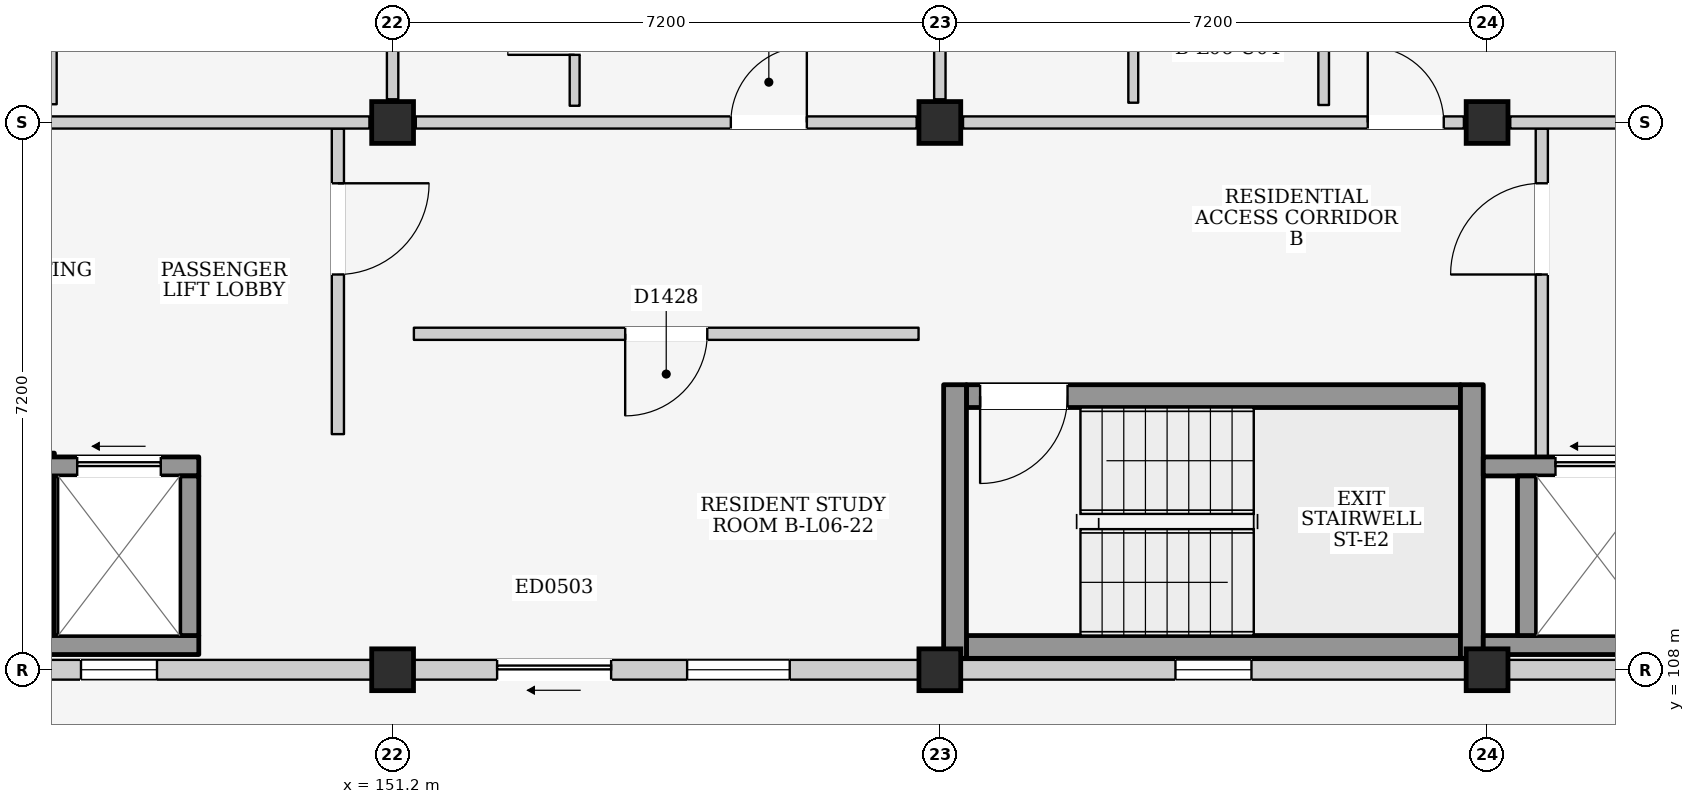
"""IFC4 building model, lengths in metres.
Left out: names, types, materials, properties, quantities, classifications, styles, units other than length and angle.
Written with IfcOpenShell. Run it as: python <this file> out.ifc"""

import sys

from ifc_helpers import new_model, si_unit, direction, frame, frame_2d, origin, origin_2d, place, context, subcontext, project, spatial, rectangle, extrude, element, fill, save


model = new_model("IFC4")
c1 = context("Model", 3, precision=1e-05, world=origin(), true_north=direction((0.0, 1.0)))
c2 = subcontext(c1, "Body", "Model", "MODEL_VIEW")
j1 = project(units=[si_unit("LENGTHUNIT", "METRE"), si_unit("PLANEANGLEUNIT", "RADIAN")], contexts=[c1])
p1 = place(None, origin())
s1 = spatial("IfcSite", under=j1, at=p1, CompositionType="ELEMENT")
p2 = place(p1, origin())
s2 = spatial("IfcBuilding", under=s1, at=p2, CompositionType="ELEMENT")
p3 = place(p2, frame((0.0, 0.0, 21.9)))
s3 = spatial("IfcBuildingStorey", under=s2, at=p3, CompositionType="ELEMENT", Elevation=21.9)
for number, where, z_axis, x_axis in (
    (1, (151.2, 108.0, 0.0), (0.0, 0.0, 1.0), (1.0, 0.0, 0.0)),
    (2, (151.2, 115.2, 0.0), (0.0, 0.0, 1.0), (1.0, 0.0, 0.0)),
    (3, (158.4, 108.0, 0.0), (0.0, 0.0, 1.0), (1.0, 0.0, 0.0)),
    (4, (158.4, 115.2, 0.0), (0.0, 0.0, 1.0), (1.0, 0.0, 0.0)),
    (5, (165.6, 108.0, 0.0), (0.0, 0.0, 1.0), (1.0, 0.0, 0.0)),
    (6, (165.6, 115.2, 0.0), (0.0, 0.0, 1.0), (1.0, 0.0, 0.0)),
):
    element("IfcColumn", number, at=place(p3, frame(where, z_axis=z_axis, x_axis=x_axis)), inside=s3, PredefinedType="COLUMN", context=c2, shape_type="SweptSolid", body=[
        extrude(rectangle(XDim=0.55, YDim=0.55, at=origin_2d()), origin(), (0.0, 0.0, 1.0), 3.2),
    ])
p4 = place(p3, frame((144.275, 108.0, 0.0), z_axis=(0.0, 0.0, 1.0), x_axis=(1.0, 0.0, 0.0)))
e7 = element("IfcWall", 7, at=p4, inside=s3, PredefinedType="ELEMENTEDWALL", context=c2, shape_type="SweptSolid", body=[
    extrude(rectangle(XDim=6.65, YDim=0.26, at=frame_2d((3.325, 0.0))), origin(), (0.0, 0.0, 1.0), 2.365),
])
p5 = place(p4, frame((2.825, 0.0, 1.2)))
e8 = element("IfcOpeningElement", 8, at=p5, cuts=e7, PredefinedType="OPENING", context=c2, shape_type="SweptSolid", body=[
    extrude(rectangle(XDim=1.0, YDim=0.9, at=frame_2d((0.5, 0.45))), frame((0.0, 0.145, 0.0), z_axis=(0.0, -1.0, 0.0), x_axis=(1.0, 0.0, 0.0)), (0.0, 0.0, 1.0), 0.29),
])
p6 = place(p3, frame((151.475, 108.0, 0.0), z_axis=(0.0, 0.0, 1.0), x_axis=(1.0, 0.0, 0.0)))
e9 = element("IfcWall", 9, at=p6, inside=s3, PredefinedType="ELEMENTEDWALL", context=c2, shape_type="SweptSolid", body=[
    extrude(rectangle(XDim=6.65, YDim=0.26, at=frame_2d((3.325, 0.0))), origin(), (0.0, 0.0, 1.0), 2.365),
])
p7 = place(p6, frame((1.1, 0.0, 0.0)))
e10 = element("IfcOpeningElement", 10, at=p7, cuts=e9, PredefinedType="OPENING", context=c2, shape_type="SweptSolid", body=[
    extrude(rectangle(XDim=1.5, YDim=2.12, at=frame_2d((0.75, 1.06))), frame((0.0, 0.145, 0.0), z_axis=(0.0, -1.0, 0.0), x_axis=(1.0, 0.0, 0.0)), (0.0, 0.0, 1.0), 0.29),
])
p8 = place(p6, frame((3.6, 0.0, 0.755)))
e11 = element("IfcOpeningElement", 11, at=p8, cuts=e9, PredefinedType="OPENING", context=c2, shape_type="SweptSolid", body=[
    extrude(rectangle(XDim=1.35, YDim=1.5, at=frame_2d((0.675, 0.75))), frame((0.0, 0.145, 0.0), z_axis=(0.0, -1.0, 0.0), x_axis=(1.0, 0.0, 0.0)), (0.0, 0.0, 1.0), 0.29),
])
p9 = place(p3, frame((158.675, 108.0, 0.0), z_axis=(0.0, 0.0, 1.0), x_axis=(1.0, 0.0, 0.0)))
e12 = element("IfcWall", 12, at=p9, inside=s3, PredefinedType="ELEMENTEDWALL", context=c2, shape_type="SweptSolid", body=[
    extrude(rectangle(XDim=6.65, YDim=0.26, at=frame_2d((3.325, 0.0))), origin(), (0.0, 0.0, 1.0), 2.365),
])
p10 = place(p9, frame((2.825, 0.0, 1.2)))
e13 = element("IfcOpeningElement", 13, at=p10, cuts=e12, PredefinedType="OPENING", context=c2, shape_type="SweptSolid", body=[
    extrude(rectangle(XDim=1.0, YDim=0.9, at=frame_2d((0.5, 0.45))), frame((0.0, 0.145, 0.0), z_axis=(0.0, -1.0, 0.0), x_axis=(1.0, 0.0, 0.0)), (0.0, 0.0, 1.0), 0.29),
])
p11 = place(p3, frame((165.875, 108.0, 0.0), z_axis=(0.0, 0.0, 1.0), x_axis=(1.0, 0.0, 0.0)))
e14 = element("IfcWall", 14, at=p11, inside=s3, PredefinedType="ELEMENTEDWALL", context=c2, shape_type="SweptSolid", body=[
    extrude(rectangle(XDim=6.65, YDim=0.26, at=frame_2d((3.325, 0.0))), origin(), (0.0, 0.0, 1.0), 2.365),
])
p12 = place(p11, frame((2.825, 0.0, 1.2)))
e15 = element("IfcOpeningElement", 15, at=p12, cuts=e14, PredefinedType="OPENING", context=c2, shape_type="SweptSolid", body=[
    extrude(rectangle(XDim=1.0, YDim=0.9, at=frame_2d((0.5, 0.45))), frame((0.0, 0.145, 0.0), z_axis=(0.0, -1.0, 0.0), x_axis=(1.0, 0.0, 0.0)), (0.0, 0.0, 1.0), 0.29),
])
p13 = place(p3, frame((150.48, 111.1, 0.0), z_axis=(0.0, 0.0, 1.0), x_axis=(0.0, 1.0, 0.0)))
e16 = element("IfcWall", 16, at=p13, inside=s3, PredefinedType="PARTITIONING", context=c2, shape_type="SweptSolid", body=[
    extrude(rectangle(XDim=4.02, YDim=0.16, at=frame_2d((2.01, 0.0))), origin(), (0.0, 0.0, 1.0), 2.98),
])
p14 = place(p13, frame((2.1, 0.0, 0.0)))
e17 = element("IfcOpeningElement", 17, at=p14, cuts=e16, PredefinedType="OPENING", context=c2, shape_type="SweptSolid", body=[
    extrude(rectangle(XDim=1.2, YDim=2.2, at=frame_2d((0.6, 1.1))), frame((0.0, 0.095, 0.0), z_axis=(0.0, -1.0, 0.0), x_axis=(1.0, 0.0, 0.0)), (0.0, 0.0, 1.0), 0.19),
])
p15 = place(p3, frame((146.625, 108.45, 0.0), z_axis=(0.0, 0.0, 1.0), x_axis=(0.0, 1.0, 0.0)))
e18 = element("IfcWall", 18, at=p15, inside=s3, PredefinedType="SHEAR", context=c2, shape_type="SweptSolid", body=[
    extrude(rectangle(XDim=2.4, YDim=0.25, at=frame_2d((1.2, 0.0))), origin(), (0.0, 0.0, 1.0), 2.98),
])
p16 = place(p3, frame((146.625, 108.325, 0.0), z_axis=(0.0, 0.0, 1.0), x_axis=(1.0, 0.0, 0.0)))
e19 = element("IfcWall", 19, at=p16, inside=s3, PredefinedType="SHEAR", context=c2, shape_type="SweptSolid", body=[
    extrude(rectangle(XDim=2.025, YDim=0.25, at=frame_2d((1.012, 0.0))), origin(), (0.0, 0.0, 1.0), 2.98),
])
p17 = place(p3, frame((146.625, 110.675, 0.0), z_axis=(0.0, 0.0, 1.0), x_axis=(1.0, 0.0, 0.0)))
e20 = element("IfcWall", 20, at=p17, inside=s3, PredefinedType="SHEAR", context=c2, shape_type="SweptSolid", body=[
    extrude(rectangle(XDim=2.025, YDim=0.25, at=frame_2d((1.012, 0.0))), origin(), (0.0, 0.0, 1.0), 2.98),
])
p18 = place(p17, frame((0.425, 0.0, 0.0)))
e21 = element("IfcOpeningElement", 21, at=p18, cuts=e20, PredefinedType="OPENING", context=c2, shape_type="SweptSolid", body=[
    extrude(rectangle(XDim=1.1, YDim=2.15, at=frame_2d((0.55, 1.075))), frame((0.0, 0.14, 0.0), z_axis=(0.0, -1.0, 0.0), x_axis=(1.0, 0.0, 0.0)), (0.0, 0.0, 1.0), 0.28),
])
p19 = place(p3, frame((148.525, 108.45, 0.0), z_axis=(0.0, 0.0, 1.0), x_axis=(0.0, 1.0, 0.0)))
e22 = element("IfcWall", 22, at=p19, inside=s3, PredefinedType="SHEAR", context=c2, shape_type="SweptSolid", body=[
    extrude(rectangle(XDim=2.1, YDim=0.25, at=frame_2d((1.05, 0.0))), origin(), (0.0, 0.0, 1.0), 2.98),
])
p20 = place(p3, frame((158.75, 108.3, 0.0), z_axis=(0.0, 0.0, 1.0), x_axis=(1.0, 0.0, 0.0)))
e23 = element("IfcWall", 23, at=p20, inside=s3, PredefinedType="SHEAR", context=c2, shape_type="SweptSolid", body=[
    extrude(rectangle(XDim=6.5, YDim=0.3, at=frame_2d((3.25, 0.0))), origin(), (0.0, 0.0, 1.0), 2.98),
])
p21 = place(p3, frame((158.75, 111.6, 0.0), z_axis=(0.0, 0.0, 1.0), x_axis=(1.0, 0.0, 0.0)))
e24 = element("IfcWall", 24, at=p21, inside=s3, PredefinedType="SHEAR", context=c2, shape_type="SweptSolid", body=[
    extrude(rectangle(XDim=6.5, YDim=0.3, at=frame_2d((3.25, 0.0))), origin(), (0.0, 0.0, 1.0), 2.98),
])
p22 = place(p21, frame((0.18, 0.0, 0.0)))
e25 = element("IfcOpeningElement", 25, at=p22, cuts=e24, PredefinedType="OPENING", context=c2, shape_type="SweptSolid", body=[
    extrude(rectangle(XDim=1.15, YDim=2.2, at=frame_2d((0.575, 1.1))), frame((0.0, 0.165, 0.0), z_axis=(0.0, -1.0, 0.0), x_axis=(1.0, 0.0, 0.0)), (0.0, 0.0, 1.0), 0.33),
])
for number, where, z_axis, x_axis in (
    (26, (158.6, 108.15, 0.0), (0.0, 0.0, 1.0), (0.0, 1.0, 0.0)),
    (27, (165.4, 108.15, 0.0), (0.0, 0.0, 1.0), (0.0, 1.0, 0.0)),
):
    element("IfcWall", number, at=place(p3, frame(where, z_axis=z_axis, x_axis=x_axis)), inside=s3, PredefinedType="SHEAR", context=c2, shape_type="SweptSolid", body=[
        extrude(rectangle(XDim=3.6, YDim=0.3, at=frame_2d((1.8, 0.0))), origin(), (0.0, 0.0, 1.0), 2.98),
    ])
p23 = place(p3, frame((166.32, 110.8, 0.0), z_axis=(0.0, 0.0, 1.0), x_axis=(0.0, 1.0, 0.0)))
e28 = element("IfcWall", 28, at=p23, inside=s3, PredefinedType="PARTITIONING", context=c2, shape_type="SweptSolid", body=[
    extrude(rectangle(XDim=4.32, YDim=0.16, at=frame_2d((2.16, 0.0))), origin(), (0.0, 0.0, 1.0), 2.98),
])
p24 = place(p23, frame((2.4, 0.0, 0.0)))
e29 = element("IfcOpeningElement", 29, at=p24, cuts=e28, PredefinedType="OPENING", context=c2, shape_type="SweptSolid", body=[
    extrude(rectangle(XDim=1.2, YDim=2.2, at=frame_2d((0.6, 1.1))), frame((0.0, 0.095, 0.0), z_axis=(0.0, -1.0, 0.0), x_axis=(1.0, 0.0, 0.0)), (0.0, 0.0, 1.0), 0.19),
])
p25 = place(p3, frame((165.55, 108.325, 0.0), z_axis=(0.0, 0.0, 1.0), x_axis=(1.0, 0.0, 0.0)))
e30 = element("IfcWall", 30, at=p25, inside=s3, PredefinedType="SHEAR", context=c2, shape_type="SweptSolid", body=[
    extrude(rectangle(XDim=2.55, YDim=0.25, at=frame_2d((1.275, 0.0))), origin(), (0.0, 0.0, 1.0), 2.98),
])
p26 = place(p3, frame((165.55, 110.675, 0.0), z_axis=(0.0, 0.0, 1.0), x_axis=(1.0, 0.0, 0.0)))
e31 = element("IfcWall", 31, at=p26, inside=s3, PredefinedType="SHEAR", context=c2, shape_type="SweptSolid", body=[
    extrude(rectangle(XDim=2.55, YDim=0.25, at=frame_2d((1.275, 0.0))), origin(), (0.0, 0.0, 1.0), 2.98),
])
p27 = place(p26, frame((0.95, 0.0, 0.0)))
e32 = element("IfcOpeningElement", 32, at=p27, cuts=e31, PredefinedType="OPENING", context=c2, shape_type="SweptSolid", body=[
    extrude(rectangle(XDim=1.1, YDim=2.15, at=frame_2d((0.55, 1.075))), frame((0.0, 0.14, 0.0), z_axis=(0.0, -1.0, 0.0), x_axis=(1.0, 0.0, 0.0)), (0.0, 0.0, 1.0), 0.28),
])
p28 = place(p3, frame((166.125, 108.45, 0.0), z_axis=(0.0, 0.0, 1.0), x_axis=(0.0, 1.0, 0.0)))
e33 = element("IfcWall", 33, at=p28, inside=s3, PredefinedType="SHEAR", context=c2, shape_type="SweptSolid", body=[
    extrude(rectangle(XDim=2.1, YDim=0.25, at=frame_2d((1.05, 0.0))), origin(), (0.0, 0.0, 1.0), 2.98),
])
p29 = place(p3, frame((144.305, 115.2, 0.0), z_axis=(0.0, 0.0, 1.0), x_axis=(1.0, 0.0, 0.0)))
e34 = element("IfcWall", 34, at=p29, inside=s3, PredefinedType="PARTITIONING", context=c2, shape_type="SweptSolid", body=[
    extrude(rectangle(XDim=6.59, YDim=0.16, at=frame_2d((3.295, 0.0))), origin(), (0.0, 0.0, 1.0), 2.365),
])
p30 = place(p3, frame((151.2, 115.505, 0.0), z_axis=(0.0, 0.0, 1.0), x_axis=(0.0, 1.0, 0.0)))
e35 = element("IfcWall", 35, at=p30, inside=s3, PredefinedType="PARTITIONING", context=c2, shape_type="SweptSolid", body=[
    extrude(rectangle(XDim=6.59, YDim=0.15, at=frame_2d((3.295, 0.0))), origin(), (0.0, 0.0, 1.0), 2.465),
])
p31 = place(p3, frame((146.72, 115.44, 0.0), z_axis=(0.0, 0.0, 1.0), x_axis=(0.0, 1.0, 0.0)))
e36 = element("IfcWall", 36, at=p31, inside=s3, PredefinedType="PARTITIONING", context=c2, shape_type="SweptSolid", body=[
    extrude(rectangle(XDim=3.04, YDim=0.12, at=frame_2d((1.52, 0.0))), origin(), (0.0, 0.0, 1.0), 2.98),
])
p32 = place(p31, frame((1.04, 0.0, 0.0)))
e37 = element("IfcOpeningElement", 37, at=p32, cuts=e36, PredefinedType="OPENING", context=c2, shape_type="SweptSolid", body=[
    extrude(rectangle(XDim=0.96, YDim=2.15, at=frame_2d((0.48, 1.075))), frame((0.0, 0.075, 0.0), z_axis=(0.0, -1.0, 0.0), x_axis=(1.0, 0.0, 0.0)), (0.0, 0.0, 1.0), 0.15),
])
p33 = place(p3, frame((151.505, 115.2, 0.0), z_axis=(0.0, 0.0, 1.0), x_axis=(1.0, 0.0, 0.0)))
e38 = element("IfcWall", 38, at=p33, inside=s3, PredefinedType="PARTITIONING", context=c2, shape_type="SweptSolid", body=[
    extrude(rectangle(XDim=6.59, YDim=0.16, at=frame_2d((3.295, 0.0))), origin(), (0.0, 0.0, 1.0), 2.365),
])
p34 = place(p33, frame((4.145, 0.0, 0.0)))
e39 = element("IfcOpeningElement", 39, at=p34, cuts=e38, PredefinedType="OPENING", context=c2, shape_type="SweptSolid", body=[
    extrude(rectangle(XDim=1.0, YDim=2.15, at=frame_2d((0.5, 1.075))), frame((0.0, 0.095, 0.0), z_axis=(0.0, -1.0, 0.0), x_axis=(1.0, 0.0, 0.0)), (0.0, 0.0, 1.0), 0.19),
])
p35 = place(p3, frame((158.4, 115.505, 0.0), z_axis=(0.0, 0.0, 1.0), x_axis=(0.0, 1.0, 0.0)))
e40 = element("IfcWall", 40, at=p35, inside=s3, PredefinedType="PARTITIONING", context=c2, shape_type="SweptSolid", body=[
    extrude(rectangle(XDim=6.59, YDim=0.15, at=frame_2d((3.295, 0.0))), origin(), (0.0, 0.0, 1.0), 2.465),
])
p36 = place(p3, frame((153.595, 115.42, 0.0), z_axis=(0.0, 0.0, 1.0), x_axis=(0.0, 1.0, 0.0)))
e41 = element("IfcWall", 41, at=p36, inside=s3, PredefinedType="PARTITIONING", context=c2, shape_type="SweptSolid", body=[
    extrude(rectangle(XDim=2.22, YDim=0.13, at=frame_2d((1.11, 0.0))), origin(), (0.0, 0.0, 1.0), 2.98),
])
p37 = place(p36, frame((0.67, 0.0, 0.0)))
e42 = element("IfcOpeningElement", 42, at=p37, cuts=e41, PredefinedType="OPENING", context=c2, shape_type="SweptSolid", body=[
    extrude(rectangle(XDim=0.88, YDim=2.1, at=frame_2d((0.44, 1.05))), frame((0.0, 0.08, 0.0), z_axis=(0.0, -1.0, 0.0), x_axis=(1.0, 0.0, 0.0)), (0.0, 0.0, 1.0), 0.16),
])
p38 = place(p3, frame((158.705, 115.2, 0.0), z_axis=(0.0, 0.0, 1.0), x_axis=(1.0, 0.0, 0.0)))
e43 = element("IfcWall", 43, at=p38, inside=s3, PredefinedType="PARTITIONING", context=c2, shape_type="SweptSolid", body=[
    extrude(rectangle(XDim=6.59, YDim=0.16, at=frame_2d((3.295, 0.0))), origin(), (0.0, 0.0, 1.0), 2.365),
])
p39 = place(p38, frame((5.325, 0.0, 0.0)))
e44 = element("IfcOpeningElement", 44, at=p39, cuts=e43, PredefinedType="OPENING", context=c2, shape_type="SweptSolid", body=[
    extrude(rectangle(XDim=1.0, YDim=2.15, at=frame_2d((0.5, 1.075))), frame((0.0, 0.095, 0.0), z_axis=(0.0, -1.0, 0.0), x_axis=(1.0, 0.0, 0.0)), (0.0, 0.0, 1.0), 0.19),
])
p40 = place(p3, frame((165.905, 115.2, 0.0), z_axis=(0.0, 0.0, 1.0), x_axis=(1.0, 0.0, 0.0)))
e45 = element("IfcWall", 45, at=p40, inside=s3, PredefinedType="PARTITIONING", context=c2, shape_type="SweptSolid", body=[
    extrude(rectangle(XDim=6.59, YDim=0.16, at=frame_2d((3.295, 0.0))), origin(), (0.0, 0.0, 1.0), 2.365),
])
p41 = place(p3, frame((160.945, 115.46, 0.0), z_axis=(0.0, 0.0, 1.0), x_axis=(0.0, 1.0, 0.0)))
e46 = element("IfcWall", 46, at=p41, inside=s3, PredefinedType="PARTITIONING", context=c2, shape_type="SweptSolid", body=[
    extrude(rectangle(XDim=3.04, YDim=0.13, at=frame_2d((1.52, 0.0))), origin(), (0.0, 0.0, 1.0), 2.98),
])
p42 = place(p3, frame((163.45, 115.43, 0.0), z_axis=(0.0, 0.0, 1.0), x_axis=(0.0, 1.0, 0.0)))
e47 = element("IfcWall", 47, at=p42, inside=s3, PredefinedType="PARTITIONING", context=c2, shape_type="SweptSolid", body=[
    extrude(rectangle(XDim=3.06, YDim=0.14, at=frame_2d((1.53, 0.0))), origin(), (0.0, 0.0, 1.0), 2.98),
])
p43 = place(p3, frame((151.48, 112.42, 0.0), z_axis=(0.0, 0.0, 1.0), x_axis=(1.0, 0.0, 0.0)))
e48 = element("IfcWall", 48, at=p43, inside=s3, PredefinedType="PARTITIONING", context=c2, shape_type="SweptSolid", body=[
    extrude(rectangle(XDim=6.64, YDim=0.16, at=frame_2d((3.32, 0.0))), origin(), (0.0, 0.0, 1.0), 2.98),
])
p44 = place(p43, frame((2.78, 0.0, 0.0)))
e49 = element("IfcOpeningElement", 49, at=p44, cuts=e48, PredefinedType="OPENING", context=c2, shape_type="SweptSolid", body=[
    extrude(rectangle(XDim=1.08, YDim=2.22, at=frame_2d((0.54, 1.11))), frame((0.0, 0.095, 0.0), z_axis=(0.0, -1.0, 0.0), x_axis=(1.0, 0.0, 0.0)), (0.0, 0.0, 1.0), 0.19),
])
p45 = place(p5, origin())
e50 = element("IfcWindow", 50, at=p45, inside=s3, PartitioningType="SINGLE_PANEL", PredefinedType="WINDOW", context=c2, shape_type="SweptSolid", body=[
    extrude(rectangle(XDim=1.0, YDim=0.9, at=frame_2d((0.5, 0.45))), frame((0.0, 0.03, 0.0), z_axis=(0.0, -1.0, 0.0), x_axis=(1.0, 0.0, 0.0)), (0.0, 0.0, 1.0), 0.06),
])
fill(e8, e50)
p46 = place(p7, frame((1.5, 0.0, 0.0), z_axis=(0.0, 0.0, 1.0), x_axis=(-1.0, 0.0, 0.0)))
e51 = element("IfcDoor", 51, at=p46, inside=s3, OperationType="SLIDING_TO_LEFT", PredefinedType="DOOR", context=c2, shape_type="SweptSolid", body=[
    extrude(rectangle(XDim=1.5, YDim=2.12, at=frame_2d((0.75, 1.06))), frame((0.0, 0.025, 0.0), z_axis=(0.0, -1.0, 0.0), x_axis=(1.0, 0.0, 0.0)), (0.0, 0.0, 1.0), 0.05),
])
fill(e10, e51)
p47 = place(p8, origin())
e52 = element("IfcWindow", 52, at=p47, inside=s3, PartitioningType="SINGLE_PANEL", PredefinedType="WINDOW", context=c2, shape_type="SweptSolid", body=[
    extrude(rectangle(XDim=1.35, YDim=1.5, at=frame_2d((0.675, 0.75))), frame((0.0, 0.03, 0.0), z_axis=(0.0, -1.0, 0.0), x_axis=(1.0, 0.0, 0.0)), (0.0, 0.0, 1.0), 0.06),
])
fill(e11, e52)
p48 = place(p10, origin())
e53 = element("IfcWindow", 53, at=p48, inside=s3, PartitioningType="SINGLE_PANEL", PredefinedType="WINDOW", context=c2, shape_type="SweptSolid", body=[
    extrude(rectangle(XDim=1.0, YDim=0.9, at=frame_2d((0.5, 0.45))), frame((0.0, 0.03, 0.0), z_axis=(0.0, -1.0, 0.0), x_axis=(1.0, 0.0, 0.0)), (0.0, 0.0, 1.0), 0.06),
])
fill(e13, e53)
p49 = place(p14, frame((1.2, 0.0, 0.0), z_axis=(0.0, 0.0, 1.0), x_axis=(-1.0, 0.0, 0.0)))
e54 = element("IfcDoor", 54, at=p49, inside=s3, OperationType="SINGLE_SWING_LEFT", PredefinedType="DOOR", context=c2, shape_type="SweptSolid", body=[
    extrude(rectangle(XDim=1.2, YDim=2.2, at=frame_2d((0.6, 1.1))), frame((0.0, 0.025, 0.0), z_axis=(0.0, -1.0, 0.0), x_axis=(1.0, 0.0, 0.0)), (0.0, 0.0, 1.0), 0.05),
])
fill(e17, e54)
p50 = place(p18, origin())
e55 = element("IfcDoor", 55, at=p50, inside=s3, OperationType="SLIDING_TO_LEFT", PredefinedType="DOOR", context=c2, shape_type="SweptSolid", body=[
    extrude(rectangle(XDim=1.1, YDim=2.15, at=frame_2d((0.55, 1.075))), frame((0.0, 0.025, 0.0), z_axis=(0.0, -1.0, 0.0), x_axis=(1.0, 0.0, 0.0)), (0.0, 0.0, 1.0), 0.05),
])
fill(e21, e55)
p51 = place(p22, frame((1.15, 0.0, 0.0), z_axis=(0.0, 0.0, 1.0), x_axis=(-1.0, 0.0, 0.0)))
e56 = element("IfcDoor", 56, at=p51, inside=s3, OperationType="SINGLE_SWING_RIGHT", PredefinedType="DOOR", context=c2, shape_type="SweptSolid", body=[
    extrude(rectangle(XDim=1.15, YDim=2.2, at=frame_2d((0.575, 1.1))), frame((0.0, 0.025, 0.0), z_axis=(0.0, -1.0, 0.0), x_axis=(1.0, 0.0, 0.0)), (0.0, 0.0, 1.0), 0.05),
])
fill(e25, e56)
p52 = place(p24, origin())
e57 = element("IfcDoor", 57, at=p52, inside=s3, OperationType="SINGLE_SWING_LEFT", PredefinedType="DOOR", context=c2, shape_type="SweptSolid", body=[
    extrude(rectangle(XDim=1.2, YDim=2.2, at=frame_2d((0.6, 1.1))), frame((0.0, 0.025, 0.0), z_axis=(0.0, -1.0, 0.0), x_axis=(1.0, 0.0, 0.0)), (0.0, 0.0, 1.0), 0.05),
])
fill(e29, e57)
p53 = place(p27, origin())
e58 = element("IfcDoor", 58, at=p53, inside=s3, OperationType="SLIDING_TO_LEFT", PredefinedType="DOOR", context=c2, shape_type="SweptSolid", body=[
    extrude(rectangle(XDim=1.1, YDim=2.15, at=frame_2d((0.55, 1.075))), frame((0.0, 0.025, 0.0), z_axis=(0.0, -1.0, 0.0), x_axis=(1.0, 0.0, 0.0)), (0.0, 0.0, 1.0), 0.05),
])
fill(e32, e58)
p54 = place(p34, origin())
e59 = element("IfcDoor", 59, at=p54, inside=s3, OperationType="SINGLE_SWING_RIGHT", PredefinedType="DOOR", context=c2, shape_type="SweptSolid", body=[
    extrude(rectangle(XDim=1.0, YDim=2.15, at=frame_2d((0.5, 1.075))), frame((0.0, 0.025, 0.0), z_axis=(0.0, -1.0, 0.0), x_axis=(1.0, 0.0, 0.0)), (0.0, 0.0, 1.0), 0.05),
])
fill(e39, e59)
p55 = place(p37, origin())
e60 = element("IfcDoor", 60, at=p55, inside=s3, OperationType="SINGLE_SWING_LEFT", PredefinedType="DOOR", context=c2, shape_type="SweptSolid", body=[
    extrude(rectangle(XDim=0.88, YDim=2.1, at=frame_2d((0.44, 1.05))), frame((0.0, 0.025, 0.0), z_axis=(0.0, -1.0, 0.0), x_axis=(1.0, 0.0, 0.0)), (0.0, 0.0, 1.0), 0.05),
])
fill(e42, e60)
p56 = place(p39, origin())
e61 = element("IfcDoor", 61, at=p56, inside=s3, OperationType="SINGLE_SWING_LEFT", PredefinedType="DOOR", context=c2, shape_type="SweptSolid", body=[
    extrude(rectangle(XDim=1.0, YDim=2.15, at=frame_2d((0.5, 1.075))), frame((0.0, 0.025, 0.0), z_axis=(0.0, -1.0, 0.0), x_axis=(1.0, 0.0, 0.0)), (0.0, 0.0, 1.0), 0.05),
])
fill(e44, e61)
p57 = place(p44, frame((1.08, 0.0, 0.0), z_axis=(0.0, 0.0, 1.0), x_axis=(-1.0, 0.0, 0.0)))
e62 = element("IfcDoor", 62, at=p57, inside=s3, OperationType="SINGLE_SWING_RIGHT", PredefinedType="DOOR", context=c2, shape_type="SweptSolid", body=[
    extrude(rectangle(XDim=1.08, YDim=2.22, at=frame_2d((0.54, 1.11))), frame((0.0, 0.025, 0.0), z_axis=(0.0, -1.0, 0.0), x_axis=(1.0, 0.0, 0.0)), (0.0, 0.0, 1.0), 0.05),
])
fill(e49, e62)
save(model, sys.argv[1])
